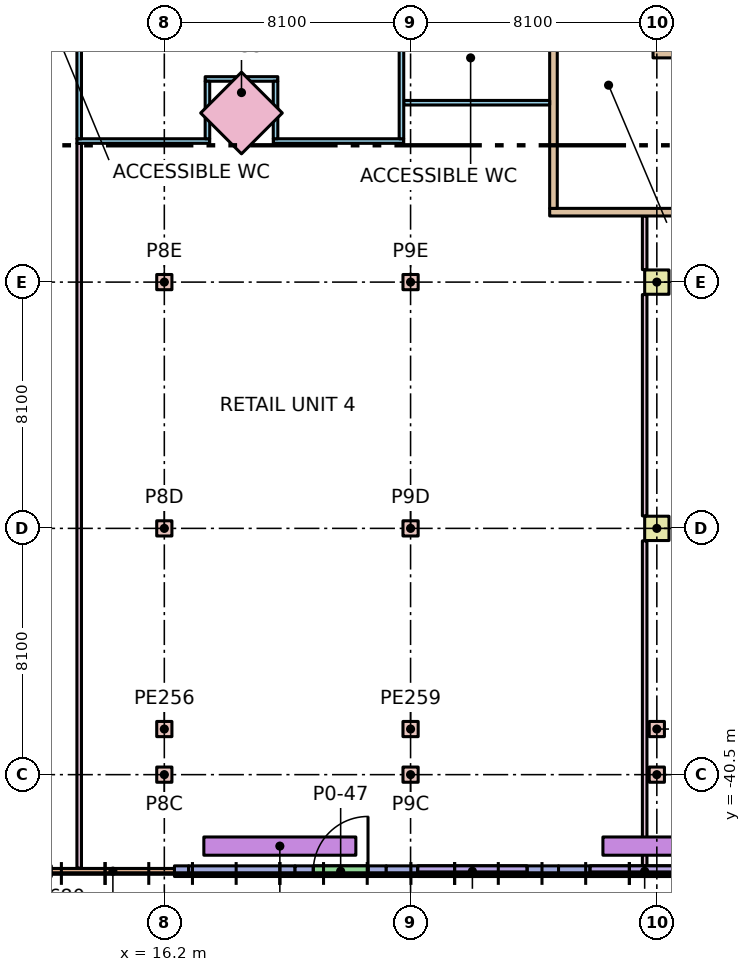
"""IFC4 building model, lengths in metres.
Left out: names, types, materials, properties, quantities, classifications, styles, units other than length and angle.
Written with IfcOpenShell. Run it as: python <this file> out.ifc"""

import sys

from ifc_helpers import new_model, si_unit, direction, frame, frame_2d, origin, origin_2d, place, context, subcontext, project, spatial, rectangle, extrude, element, fill, save


model = new_model("IFC4")
c1 = context("Model", 3, precision=1e-05, world=origin(), true_north=direction((0.0, 1.0)))
c2 = subcontext(c1, "Body", "Model", "MODEL_VIEW")
j1 = project(units=[si_unit("LENGTHUNIT", "METRE"), si_unit("PLANEANGLEUNIT", "RADIAN")], contexts=[c1])
p1 = place(None, origin())
s1 = spatial("IfcSite", under=j1, at=p1, CompositionType="ELEMENT")
p2 = place(p1, origin())
s2 = spatial("IfcBuilding", under=s1, at=p2, CompositionType="ELEMENT")
p3 = place(p2, origin())
s3 = spatial("IfcBuildingStorey", under=s2, at=p3, CompositionType="ELEMENT", Elevation=0.0)
for number, where, z_axis, x_axis in (
    (1, (16.2, -40.5, 0.0), (0.0, 0.0, 1.0), (1.0, 0.0, 0.0)),
    (2, (16.2, -32.4, 0.0), (0.0, 0.0, 1.0), (1.0, 0.0, 0.0)),
    (3, (16.2, -24.3, 0.0), (0.0, 0.0, 1.0), (1.0, 0.0, 0.0)),
    (4, (24.3, -40.5, 0.0), (0.0, 0.0, 1.0), (1.0, 0.0, 0.0)),
    (5, (24.3, -32.4, 0.0), (0.0, 0.0, 1.0), (1.0, 0.0, 0.0)),
    (6, (24.3, -24.3, 0.0), (0.0, 0.0, 1.0), (1.0, 0.0, 0.0)),
    (7, (32.4, -40.5, 0.0), (0.0, 0.0, 1.0), (1.0, 0.0, 0.0)),
):
    element("IfcColumn", number, at=place(p3, frame(where, z_axis=z_axis, x_axis=x_axis)), inside=s3, PredefinedType="COLUMN", context=c2, shape_type="SweptSolid", body=[
        extrude(rectangle(XDim=0.5, YDim=0.5, at=origin_2d()), origin(), (0.0, 0.0, 1.0), 6.0),
    ])
for number, where, z_axis, x_axis in (
    (8, (32.4, -32.4, 0.0), (0.0, 0.0, 1.0), (1.0, 0.0, 0.0)),
    (9, (32.4, -24.3, 0.0), (0.0, 0.0, 1.0), (1.0, 0.0, 0.0)),
):
    element("IfcColumn", number, at=place(p3, frame(where, z_axis=z_axis, x_axis=x_axis)), inside=s3, PredefinedType="COLUMN", context=c2, shape_type="SweptSolid", body=[
        extrude(rectangle(XDim=0.8, YDim=0.8, at=origin_2d()), origin(), (0.0, 0.0, 1.0), 6.0),
    ])
for number, where, z_axis, x_axis in (
    (10, (16.2, -39.0, 0.0), (0.0, 0.0, 1.0), (1.0, 0.0, 0.0)),
    (11, (24.3, -39.0, 0.0), (0.0, 0.0, 1.0), (1.0, 0.0, 0.0)),
    (12, (32.4, -39.0, 0.0), (0.0, 0.0, 1.0), (1.0, 0.0, 0.0)),
):
    element("IfcColumn", number, at=place(p3, frame(where, z_axis=z_axis, x_axis=x_axis)), inside=s3, PredefinedType="COLUMN", context=c2, shape_type="SweptSolid", body=[
        extrude(rectangle(XDim=0.5, YDim=0.5, at=origin_2d()), origin(), (0.0, 0.0, 1.0), 6.0),
    ])
p4 = place(p3, frame((18.738, -18.738, 0.0), z_axis=(0.0, 0.0, 1.0), x_axis=(0.707106781187, 0.707106781187, 0.0)))
e13 = element("IfcColumn", 13, at=p4, inside=s3, PredefinedType="COLUMN", context=c2, shape_type="SweptSolid", body=[
    extrude(rectangle(XDim=1.9, YDim=1.9, at=origin_2d()), origin(), (0.0, 0.0, 1.0), 6.0),
])
p5 = place(p3, frame((16.533, -43.675, 0.0), z_axis=(0.0, 0.0, 1.0), x_axis=(1.0, 0.0, 0.0)))
e14 = element("IfcWall", 14, at=p5, inside=s3, PredefinedType="STANDARD", context=c2, shape_type="SweptSolid", body=[
    extrude(rectangle(XDim=0.467, YDim=0.35, at=frame_2d((0.233, 0.0))), origin(), (0.0, 0.0, 1.0), 5.68),
])
p6 = place(p3, frame((17.0, -43.675, 0.0), z_axis=(0.0, 0.0, 1.0), x_axis=(1.0, 0.0, 0.0)))
e15 = element("IfcWall", 15, at=p6, inside=s3, PredefinedType="STANDARD", context=c2, shape_type="SweptSolid", body=[
    extrude(rectangle(XDim=3.5, YDim=0.35, at=frame_2d((1.75, 0.0))), origin(), (0.0, 0.0, 1.0), 5.68),
])
p7 = place(p3, frame((20.5, -43.675, 0.0), z_axis=(0.0, 0.0, 1.0), x_axis=(1.0, 0.0, 0.0)))
e16 = element("IfcWall", 16, at=p7, inside=s3, PredefinedType="STANDARD", context=c2, shape_type="SweptSolid", body=[
    extrude(rectangle(XDim=3.0, YDim=0.35, at=frame_2d((1.5, 0.0))), origin(), (0.0, 0.0, 1.0), 5.68),
])
p8 = place(p7, frame((0.6, 0.0, 0.0)))
e17 = element("IfcOpeningElement", 17, at=p8, cuts=e16, PredefinedType="OPENING", context=c2, shape_type="SweptSolid", body=[
    extrude(rectangle(XDim=1.8, YDim=2.7, at=frame_2d((0.9, 1.35))), frame((0.0, 0.185, 0.0), z_axis=(0.0, -1.0, 0.0), x_axis=(1.0, 0.0, 0.0)), (0.0, 0.0, 1.0), 0.37),
])
p9 = place(p3, frame((23.5, -43.675, 0.0), z_axis=(0.0, 0.0, 1.0), x_axis=(1.0, 0.0, 0.0)))
e18 = element("IfcWall", 18, at=p9, inside=s3, PredefinedType="STANDARD", context=c2, shape_type="SweptSolid", body=[
    extrude(rectangle(XDim=5.667, YDim=0.35, at=frame_2d((2.833, 0.0))), origin(), (0.0, 0.0, 1.0), 5.68),
])
p10 = place(p9, frame((1.033, 0.0, 1.0)))
e19 = element("IfcOpeningElement", 19, at=p10, cuts=e18, PredefinedType="OPENING", context=c2, shape_type="SweptSolid", body=[
    extrude(rectangle(XDim=3.6, YDim=4.0, at=frame_2d((1.8, 2.0))), frame((0.0, 0.185, 0.0), z_axis=(0.0, -1.0, 0.0), x_axis=(1.0, 0.0, 0.0)), (0.0, 0.0, 1.0), 0.37),
])
p11 = place(p3, frame((29.167, -43.675, 0.0), z_axis=(0.0, 0.0, 1.0), x_axis=(1.0, 0.0, 0.0)))
e20 = element("IfcWall", 20, at=p11, inside=s3, PredefinedType="STANDARD", context=c2, shape_type="SweptSolid", body=[
    extrude(rectangle(XDim=5.667, YDim=0.35, at=frame_2d((2.833, 0.0))), origin(), (0.0, 0.0, 1.0), 5.68),
])
p12 = place(p11, frame((1.033, 0.0, 1.0)))
e21 = element("IfcOpeningElement", 21, at=p12, cuts=e20, PredefinedType="OPENING", context=c2, shape_type="SweptSolid", body=[
    extrude(rectangle(XDim=3.6, YDim=4.0, at=frame_2d((1.8, 2.0))), frame((0.0, 0.185, 0.0), z_axis=(0.0, -1.0, 0.0), x_axis=(1.0, 0.0, 0.0)), (0.0, 0.0, 1.0), 0.37),
])
for number, where, z_axis, x_axis in (
    (22, (17.5, -42.85, 6.0), (0.0, 0.0, 1.0), (1.0, 0.0, 0.0)),
    (23, (30.627, -42.85, 6.0), (0.0, 0.0, 1.0), (1.0, 0.0, 0.0)),
):
    element("IfcWall", number, at=place(p3, frame(where, z_axis=z_axis, x_axis=x_axis)), inside=s3, PredefinedType="PARAPET", context=c2, shape_type="SweptSolid", body=[
        extrude(rectangle(XDim=5.0, YDim=0.6, at=frame_2d((2.5, 0.0))), origin(), (0.0, 0.0, 1.0), 0.9),
    ])
p13 = place(p3, frame((32.275, -16.8, 0.0), z_axis=(0.0, 0.0, 1.0), x_axis=(1.0, 0.0, 0.0)))
e24 = element("IfcWall", 24, at=p13, inside=s3, PredefinedType="PARTITIONING", context=c2, shape_type="SweptSolid", body=[
    extrude(rectangle(XDim=1.85, YDim=0.25, at=frame_2d((0.925, 0.0))), origin(), (0.0, 0.0, 1.0), 5.68),
])
p14 = place(p3, frame((24.075, -18.4, 0.0), z_axis=(0.0, 0.0, 1.0), x_axis=(1.0, 0.0, 0.0)))
e25 = element("IfcWall", 25, at=p14, inside=s3, PredefinedType="PARTITIONING", context=c2, shape_type="SweptSolid", body=[
    extrude(rectangle(XDim=4.8, YDim=0.15, at=frame_2d((2.4, 0.0))), origin(), (0.0, 0.0, 1.0), 5.68),
])
p15 = place(p3, frame((28.875, -22.0, 0.0), z_axis=(0.0, 0.0, 1.0), x_axis=(1.0, 0.0, 0.0)))
e26 = element("IfcWall", 26, at=p15, inside=s3, PredefinedType="PARTITIONING", context=c2, shape_type="SweptSolid", body=[
    extrude(rectangle(XDim=5.25, YDim=0.25, at=frame_2d((2.625, 0.0))), origin(), (0.0, 0.0, 1.0), 5.68),
])
p16 = place(p3, frame((29.0, -21.875, 0.0), z_axis=(0.0, 0.0, 1.0), x_axis=(0.0, 1.0, 0.0)))
e27 = element("IfcWall", 27, at=p16, inside=s3, PredefinedType="PARTITIONING", context=c2, shape_type="SweptSolid", body=[
    extrude(rectangle(XDim=7.75, YDim=0.25, at=frame_2d((3.875, 0.0))), origin(), (0.0, 0.0, 1.0), 5.68),
])
p17 = place(p3, frame((13.325, -19.66, 0.0), z_axis=(0.0, 0.0, 1.0), x_axis=(1.0, 0.0, 0.0)))
e28 = element("IfcWall", 28, at=p17, inside=s3, PredefinedType="PARTITIONING", context=c2, shape_type="SweptSolid", body=[
    extrude(rectangle(XDim=4.368, YDim=0.15, at=frame_2d((2.184, 0.0))), origin(), (0.0, 0.0, 1.0), 5.68),
])
p18 = place(p3, frame((19.783, -19.66, 0.0), z_axis=(0.0, 0.0, 1.0), x_axis=(1.0, 0.0, 0.0)))
e29 = element("IfcWall", 29, at=p18, inside=s3, PredefinedType="PARTITIONING", context=c2, shape_type="SweptSolid", body=[
    extrude(rectangle(XDim=4.292, YDim=0.15, at=frame_2d((2.146, 0.0))), origin(), (0.0, 0.0, 1.0), 5.68),
])
p19 = place(p3, frame((17.543, -17.618, 0.0), z_axis=(0.0, 0.0, 1.0), x_axis=(1.0, 0.0, 0.0)))
e30 = element("IfcWall", 30, at=p19, inside=s3, PredefinedType="PARTITIONING", context=c2, shape_type="SweptSolid", body=[
    extrude(rectangle(XDim=2.39, YDim=0.15, at=frame_2d((1.195, 0.0))), origin(), (0.0, 0.0, 1.0), 5.68),
])
for number, where, z_axis, x_axis in (
    (31, (17.618, -19.585, 0.0), (0.0, 0.0, 1.0), (0.0, 1.0, 0.0)),
    (32, (19.858, -19.585, 0.0), (0.0, 0.0, 1.0), (0.0, 1.0, 0.0)),
):
    element("IfcWall", number, at=place(p3, frame(where, z_axis=z_axis, x_axis=x_axis)), inside=s3, PredefinedType="PARTITIONING", context=c2, shape_type="SweptSolid", body=[
        extrude(rectangle(XDim=1.892, YDim=0.15, at=frame_2d((0.946, 0.0))), origin(), (0.0, 0.0, 1.0), 5.68),
    ])
p20 = place(p3, frame((24.0, -19.585, 0.0), z_axis=(0.0, 0.0, 1.0), x_axis=(0.0, 1.0, 0.0)))
e33 = element("IfcWall", 33, at=p20, inside=s3, PredefinedType="PARTITIONING", context=c2, shape_type="SweptSolid", body=[
    extrude(rectangle(XDim=3.125, YDim=0.15, at=frame_2d((1.563, 0.0))), origin(), (0.0, 0.0, 1.0), 5.68),
])
p21 = place(p3, frame((13.4, -19.585, 0.0), z_axis=(0.0, 0.0, 1.0), x_axis=(0.0, 1.0, 0.0)))
e34 = element("IfcWall", 34, at=p21, inside=s3, PredefinedType="PARTITIONING", context=c2, shape_type="SweptSolid", body=[
    extrude(rectangle(XDim=5.51, YDim=0.15, at=frame_2d((2.755, 0.0))), origin(), (0.0, 0.0, 1.0), 5.68),
])
p22 = place(p3, frame((13.4, -43.575, 0.0), z_axis=(0.0, 0.0, 1.0), x_axis=(0.0, 1.0, 0.0)))
e35 = element("IfcWall", 35, at=p22, inside=s3, PredefinedType="PARTITIONING", context=c2, shape_type="SweptSolid", body=[
    extrude(rectangle(XDim=23.84, YDim=0.15, at=frame_2d((11.92, 0.0))), origin(), (0.0, 0.0, 1.0), 5.68),
])
p23 = place(p3, frame((32.0, -43.5, 0.0), z_axis=(0.0, 0.0, 1.0), x_axis=(0.0, 1.0, 0.0)))
e36 = element("IfcWall", 36, at=p23, inside=s3, PredefinedType="PARTITIONING", context=c2, shape_type="SweptSolid", body=[
    extrude(rectangle(XDim=10.69, YDim=0.15, at=frame_2d((5.345, 0.0))), origin(), (0.0, 0.0, 1.0), 5.68),
])
p24 = place(p3, frame((32.0, -31.99, 0.0), z_axis=(0.0, 0.0, 1.0), x_axis=(0.0, 1.0, 0.0)))
e37 = element("IfcWall", 37, at=p24, inside=s3, PredefinedType="PARTITIONING", context=c2, shape_type="SweptSolid", body=[
    extrude(rectangle(XDim=7.28, YDim=0.15, at=frame_2d((3.64, 0.0))), origin(), (0.0, 0.0, 1.0), 5.68),
])
p25 = place(p3, frame((32.0, -23.89, 0.0), z_axis=(0.0, 0.0, 1.0), x_axis=(0.0, 1.0, 0.0)))
e38 = element("IfcWall", 38, at=p25, inside=s3, PredefinedType="PARTITIONING", context=c2, shape_type="SweptSolid", body=[
    extrude(rectangle(XDim=1.765, YDim=0.15, at=frame_2d((0.882, 0.0))), origin(), (0.0, 0.0, 1.0), 5.68),
])
p26 = place(p10, origin())
e39 = element("IfcWindow", 39, at=p26, inside=s3, PartitioningType="SINGLE_PANEL", PredefinedType="WINDOW", context=c2, shape_type="SweptSolid", body=[
    extrude(rectangle(XDim=3.6, YDim=4.0, at=frame_2d((1.8, 2.0))), frame((0.0, 0.03, 0.0), z_axis=(0.0, -1.0, 0.0), x_axis=(1.0, 0.0, 0.0)), (0.0, 0.0, 1.0), 0.06),
])
fill(e19, e39)
p27 = place(p12, origin())
e40 = element("IfcWindow", 40, at=p27, inside=s3, PartitioningType="SINGLE_PANEL", PredefinedType="WINDOW", context=c2, shape_type="SweptSolid", body=[
    extrude(rectangle(XDim=3.6, YDim=4.0, at=frame_2d((1.8, 2.0))), frame((0.0, 0.03, 0.0), z_axis=(0.0, -1.0, 0.0), x_axis=(1.0, 0.0, 0.0)), (0.0, 0.0, 1.0), 0.06),
])
fill(e21, e40)
p28 = place(p8, frame((1.8, 0.0, 0.0), z_axis=(0.0, 0.0, 1.0), x_axis=(-1.0, 0.0, 0.0)))
e41 = element("IfcDoor", 41, at=p28, inside=s3, OperationType="SINGLE_SWING_RIGHT", PredefinedType="DOOR", context=c2, shape_type="SweptSolid", body=[
    extrude(rectangle(XDim=1.8, YDim=2.7, at=frame_2d((0.9, 1.35))), frame((0.0, 0.025, 0.0), z_axis=(0.0, -1.0, 0.0), x_axis=(1.0, 0.0, 0.0)), (0.0, 0.0, 1.0), 0.05),
])
fill(e17, e41)
save(model, sys.argv[1])
